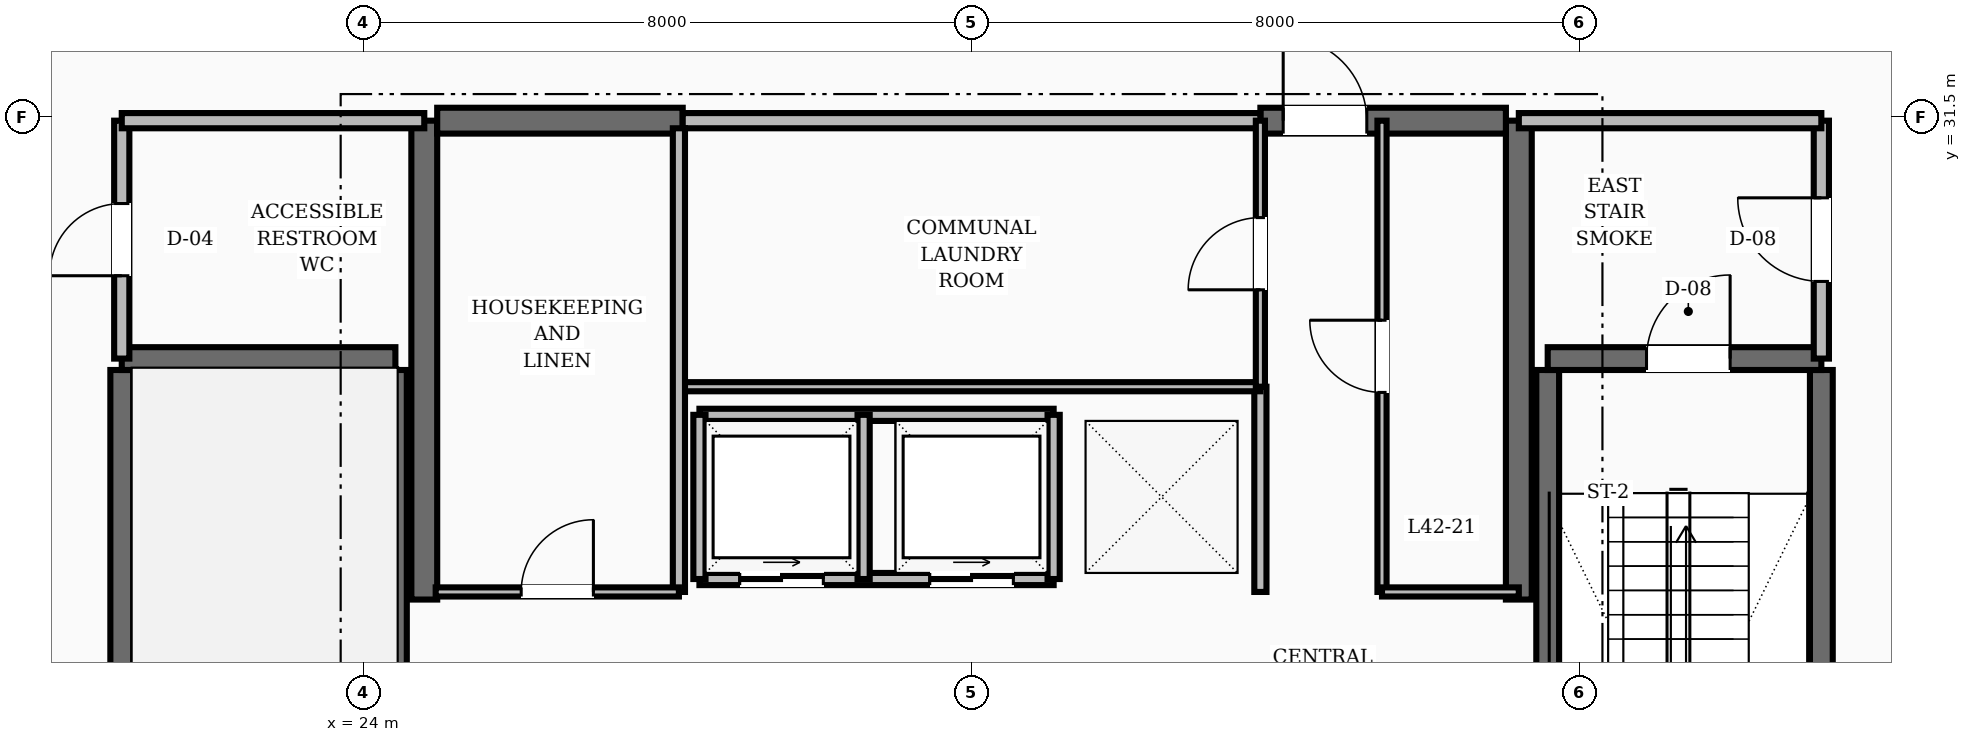
"""IFC4 building model, lengths in metres.
Left out: names, types, materials, properties, quantities, classifications, styles, units other than length and angle.
Written with IfcOpenShell. Run it as: python <this file> out.ifc"""

import sys

from ifc_helpers import new_model, si_unit, direction, frame, frame_2d, origin, place, context, subcontext, project, spatial, rectangle, extrude, element, fill, save


model = new_model("IFC4")
c1 = context("Model", 3, precision=1e-05, world=origin(), true_north=direction((0.0, 1.0)))
c2 = subcontext(c1, "Body", "Model", "MODEL_VIEW")
j1 = project(units=[si_unit("LENGTHUNIT", "METRE"), si_unit("PLANEANGLEUNIT", "RADIAN")], contexts=[c1])
p1 = place(None, origin())
s1 = spatial("IfcSite", under=j1, at=p1, CompositionType="ELEMENT")
p2 = place(p1, origin())
s2 = spatial("IfcBuilding", under=s1, at=p2, CompositionType="ELEMENT")
p3 = place(p2, frame((0.0, 0.0, 164.0)))
s3 = spatial("IfcBuildingStorey", under=s2, at=p3, CompositionType="ELEMENT", Elevation=164.0)
for number, where, z_axis, x_axis in (
    (1, (24.8, 25.15, 0.0), (0.0, 0.0, 1.0), (0.0, 1.0, 0.0)),
    (2, (39.2, 25.15, 0.0), (0.0, 0.0, 1.0), (0.0, 1.0, 0.0)),
):
    element("IfcWall", number, at=place(p3, frame(where, z_axis=z_axis, x_axis=x_axis)), inside=s3, PredefinedType="SHEAR", context=c2, shape_type="SweptSolid", body=[
        extrude(rectangle(XDim=6.3, YDim=0.34, at=frame_2d((3.15, 0.0))), origin(), (0.0, 0.0, 1.0), 3.6),
    ])
p4 = place(p3, frame((24.97, 31.45, 0.0), z_axis=(0.0, 0.0, 1.0), x_axis=(1.0, 0.0, 0.0)))
e3 = element("IfcWall", 3, at=p4, inside=s3, PredefinedType="SHEAR", context=c2, shape_type="SweptSolid", body=[
    extrude(rectangle(XDim=3.23, YDim=0.34, at=frame_2d((1.615, 0.0))), origin(), (0.0, 0.0, 1.0), 3.6),
])
p5 = place(p3, frame((35.8, 31.45, 0.0), z_axis=(0.0, 0.0, 1.0), x_axis=(1.0, 0.0, 0.0)))
e4 = element("IfcWall", 4, at=p5, inside=s3, PredefinedType="SHEAR", context=c2, shape_type="SweptSolid", body=[
    extrude(rectangle(XDim=3.23, YDim=0.34, at=frame_2d((1.615, 0.0))), origin(), (0.0, 0.0, 1.0), 3.6),
])
p6 = place(p5, frame((0.3, 0.0, 0.0)))
e5 = element("IfcOpeningElement", 5, at=p6, cuts=e4, PredefinedType="OPENING", context=c2, shape_type="SweptSolid", body=[
    extrude(rectangle(XDim=1.1, YDim=2.1, at=frame_2d((0.55, 1.05))), frame((0.0, 0.18, 0.0), z_axis=(0.0, -1.0, 0.0), x_axis=(1.0, 0.0, 0.0)), (0.0, 0.0, 1.0), 0.36),
])
for number, where, z_axis, x_axis in (
    (6, (20.82, 19.43, 0.0), (0.0, 0.0, 1.0), (0.0, 1.0, 0.0)),
    (7, (24.42, 19.43, 0.0), (0.0, 0.0, 1.0), (0.0, 1.0, 0.0)),
):
    element("IfcWall", number, at=place(p3, frame(where, z_axis=z_axis, x_axis=x_axis)), inside=s3, PredefinedType="SHEAR", context=c2, shape_type="SweptSolid", body=[
        extrude(rectangle(XDim=8.74, YDim=0.3, at=frame_2d((4.37, 0.0))), origin(), (0.0, 0.0, 1.0), 3.6),
    ])
p7 = place(p3, frame((20.82, 28.32, 0.0), z_axis=(0.0, 0.0, 1.0), x_axis=(1.0, 0.0, 0.0)))
e8 = element("IfcWall", 8, at=p7, inside=s3, PredefinedType="SHEAR", context=c2, shape_type="SweptSolid", body=[
    extrude(rectangle(XDim=3.6, YDim=0.3, at=frame_2d((1.8, 0.0))), origin(), (0.0, 0.0, 1.0), 3.6),
])
for number, where, z_axis, x_axis in (
    (9, (43.18, 19.43, 0.0), (0.0, 0.0, 1.0), (0.0, 1.0, 0.0)),
    (10, (39.58, 19.43, 0.0), (0.0, 0.0, 1.0), (0.0, 1.0, 0.0)),
):
    element("IfcWall", number, at=place(p3, frame(where, z_axis=z_axis, x_axis=x_axis)), inside=s3, PredefinedType="SHEAR", context=c2, shape_type="SweptSolid", body=[
        extrude(rectangle(XDim=8.74, YDim=0.3, at=frame_2d((4.37, 0.0))), origin(), (0.0, 0.0, 1.0), 3.6),
    ])
p8 = place(p3, frame((39.58, 28.32, 0.0), z_axis=(0.0, 0.0, 1.0), x_axis=(1.0, 0.0, 0.0)))
e11 = element("IfcWall", 11, at=p8, inside=s3, PredefinedType="SHEAR", context=c2, shape_type="SweptSolid", body=[
    extrude(rectangle(XDim=3.6, YDim=0.3, at=frame_2d((1.8, 0.0))), origin(), (0.0, 0.0, 1.0), 3.6),
])
p9 = place(p8, frame((1.3, 0.0, 0.0)))
e12 = element("IfcOpeningElement", 12, at=p9, cuts=e11, PredefinedType="OPENING", context=c2, shape_type="SweptSolid", body=[
    extrude(rectangle(XDim=1.1, YDim=2.1, at=frame_2d((0.55, 1.05))), frame((0.0, 0.16, 0.0), z_axis=(0.0, -1.0, 0.0), x_axis=(1.0, 0.0, 0.0)), (0.0, 0.0, 1.0), 0.32),
])
p10 = place(p3, frame((43.18, 28.32, 0.0), z_axis=(0.0, 0.0, 1.0), x_axis=(0.0, 1.0, 0.0)))
e13 = element("IfcWall", 13, at=p10, inside=s3, PredefinedType="SOLIDWALL", context=c2, shape_type="SweptSolid", body=[
    extrude(rectangle(XDim=3.13, YDim=0.2, at=frame_2d((1.565, 0.0))), origin(), (0.0, 0.0, 1.0), 2.8),
])
p11 = place(p10, frame((1.015, 0.0, 0.0)))
e14 = element("IfcOpeningElement", 14, at=p11, cuts=e13, PredefinedType="OPENING", context=c2, shape_type="SweptSolid", body=[
    extrude(rectangle(XDim=1.1, YDim=2.1, at=frame_2d((0.55, 1.05))), frame((0.0, 0.11, 0.0), z_axis=(0.0, -1.0, 0.0), x_axis=(1.0, 0.0, 0.0)), (0.0, 0.0, 1.0), 0.22),
])
p12 = place(p3, frame((39.2, 31.45, 0.0), z_axis=(0.0, 0.0, 1.0), x_axis=(1.0, 0.0, 0.0)))
e15 = element("IfcWall", 15, at=p12, inside=s3, PredefinedType="SOLIDWALL", context=c2, shape_type="SweptSolid", body=[
    extrude(rectangle(XDim=3.98, YDim=0.2, at=frame_2d((1.99, 0.0))), origin(), (0.0, 0.0, 1.0), 2.8),
])
p13 = place(p3, frame((20.82, 28.32, 0.0), z_axis=(0.0, 0.0, 1.0), x_axis=(0.0, 1.0, 0.0)))
e16 = element("IfcWall", 16, at=p13, inside=s3, PredefinedType="SOLIDWALL", context=c2, shape_type="SweptSolid", body=[
    extrude(rectangle(XDim=3.13, YDim=0.2, at=frame_2d((1.565, 0.0))), origin(), (0.0, 0.0, 1.0), 2.8),
])
p14 = place(p13, frame((1.09, 0.0, 0.0)))
e17 = element("IfcOpeningElement", 17, at=p14, cuts=e16, PredefinedType="OPENING", context=c2, shape_type="SweptSolid", body=[
    extrude(rectangle(XDim=0.95, YDim=2.1, at=frame_2d((0.475, 1.05))), frame((0.0, 0.11, 0.0), z_axis=(0.0, -1.0, 0.0), x_axis=(1.0, 0.0, 0.0)), (0.0, 0.0, 1.0), 0.22),
])
p15 = place(p3, frame((20.82, 31.45, 0.0), z_axis=(0.0, 0.0, 1.0), x_axis=(1.0, 0.0, 0.0)))
e18 = element("IfcWall", 18, at=p15, inside=s3, PredefinedType="SOLIDWALL", context=c2, shape_type="SweptSolid", body=[
    extrude(rectangle(XDim=3.98, YDim=0.2, at=frame_2d((1.99, 0.0))), origin(), (0.0, 0.0, 1.0), 2.8),
])
p16 = place(p3, frame((35.8, 25.25, 0.0), z_axis=(0.0, 0.0, 1.0), x_axis=(0.0, 1.0, 0.0)))
e19 = element("IfcWall", 19, at=p16, inside=s3, PredefinedType="SOLIDWALL", context=c2, shape_type="SweptSolid", body=[
    extrude(rectangle(XDim=2.7, YDim=0.16, at=frame_2d((1.35, 0.0))), origin(), (0.0, 0.0, 1.0), 2.8),
])
p17 = place(p3, frame((28.42, 25.42, 0.0), z_axis=(0.0, 0.0, 1.0), x_axis=(1.0, 0.0, 0.0)))
e20 = element("IfcWall", 20, at=p17, inside=s3, PredefinedType="SOLIDWALL", context=c2, shape_type="SweptSolid", body=[
    extrude(rectangle(XDim=4.66, YDim=0.16, at=frame_2d((2.33, 0.0))), origin(), (0.0, 0.0, 1.0), 2.8),
])
p18 = place(p17, frame((0.53, 0.0, 0.0)))
e21 = element("IfcOpeningElement", 21, at=p18, cuts=e20, PredefinedType="OPENING", context=c2, shape_type="SweptSolid", body=[
    extrude(rectangle(XDim=1.1, YDim=2.15, at=frame_2d((0.55, 1.075))), frame((0.0, 0.09, 0.0), z_axis=(0.0, -1.0, 0.0), x_axis=(1.0, 0.0, 0.0)), (0.0, 0.0, 1.0), 0.18),
])
p19 = place(p17, frame((3.03, 0.0, 0.0)))
e22 = element("IfcOpeningElement", 22, at=p19, cuts=e20, PredefinedType="OPENING", context=c2, shape_type="SweptSolid", body=[
    extrude(rectangle(XDim=1.1, YDim=2.15, at=frame_2d((0.55, 1.075))), frame((0.0, 0.09, 0.0), z_axis=(0.0, -1.0, 0.0), x_axis=(1.0, 0.0, 0.0)), (0.0, 0.0, 1.0), 0.18),
])
p20 = place(p3, frame((28.42, 27.58, 0.0), z_axis=(0.0, 0.0, 1.0), x_axis=(1.0, 0.0, 0.0)))
e23 = element("IfcWall", 23, at=p20, inside=s3, PredefinedType="SOLIDWALL", context=c2, shape_type="SweptSolid", body=[
    extrude(rectangle(XDim=4.66, YDim=0.16, at=frame_2d((2.33, 0.0))), origin(), (0.0, 0.0, 1.0), 2.8),
])
for number, where, z_axis, x_axis in (
    (24, (28.42, 25.42, 0.0), (0.0, 0.0, 1.0), (0.0, 1.0, 0.0)),
    (25, (30.58, 25.42, 0.0), (0.0, 0.0, 1.0), (0.0, 1.0, 0.0)),
    (26, (33.08, 25.42, 0.0), (0.0, 0.0, 1.0), (0.0, 1.0, 0.0)),
):
    element("IfcWall", number, at=place(p3, frame(where, z_axis=z_axis, x_axis=x_axis)), inside=s3, PredefinedType="SOLIDWALL", context=c2, shape_type="SweptSolid", body=[
        extrude(rectangle(XDim=2.16, YDim=0.16, at=frame_2d((1.08, 0.0))), origin(), (0.0, 0.0, 1.0), 2.8),
    ])
p21 = place(p3, frame((28.2, 31.45, 0.0), z_axis=(0.0, 0.0, 1.0), x_axis=(1.0, 0.0, 0.0)))
e27 = element("IfcWall", 27, at=p21, inside=s3, PredefinedType="SOLIDWALL", context=c2, shape_type="SweptSolid", body=[
    extrude(rectangle(XDim=7.6, YDim=0.2, at=frame_2d((3.8, 0.0))), origin(), (0.0, 0.0, 1.0), 2.8),
])
p22 = place(p3, frame((28.2, 27.95, 0.0), z_axis=(0.0, 0.0, 1.0), x_axis=(1.0, 0.0, 0.0)))
e28 = element("IfcWall", 28, at=p22, inside=s3, PredefinedType="PARTITIONING", context=c2, shape_type="SweptSolid", body=[
    extrude(rectangle(XDim=7.6, YDim=0.12, at=frame_2d((3.8, 0.0))), origin(), (0.0, 0.0, 1.0), 2.8),
])
p23 = place(p3, frame((35.8, 27.95, 0.0), z_axis=(0.0, 0.0, 1.0), x_axis=(0.0, 1.0, 0.0)))
e29 = element("IfcWall", 29, at=p23, inside=s3, PredefinedType="PARTITIONING", context=c2, shape_type="SweptSolid", body=[
    extrude(rectangle(XDim=3.5, YDim=0.12, at=frame_2d((1.75, 0.0))), origin(), (0.0, 0.0, 1.0), 2.8),
])
p24 = place(p23, frame((1.275, 0.0, 0.0)))
e30 = element("IfcOpeningElement", 30, at=p24, cuts=e29, PredefinedType="OPENING", context=c2, shape_type="SweptSolid", body=[
    extrude(rectangle(XDim=0.95, YDim=2.1, at=frame_2d((0.475, 1.05))), frame((0.0, 0.07, 0.0), z_axis=(0.0, -1.0, 0.0), x_axis=(1.0, 0.0, 0.0)), (0.0, 0.0, 1.0), 0.14),
])
p25 = place(p3, frame((28.15, 25.25, 0.0), z_axis=(0.0, 0.0, 1.0), x_axis=(0.0, 1.0, 0.0)))
e31 = element("IfcWall", 31, at=p25, inside=s3, PredefinedType="SOLIDWALL", context=c2, shape_type="SweptSolid", body=[
    extrude(rectangle(XDim=6.1, YDim=0.16, at=frame_2d((3.05, 0.0))), origin(), (0.0, 0.0, 1.0), 2.8),
])
p26 = place(p3, frame((24.95, 25.25, 0.0), z_axis=(0.0, 0.0, 1.0), x_axis=(1.0, 0.0, 0.0)))
e32 = element("IfcWall", 32, at=p26, inside=s3, PredefinedType="PARTITIONING", context=c2, shape_type="SweptSolid", body=[
    extrude(rectangle(XDim=3.2, YDim=0.12, at=frame_2d((1.6, 0.0))), origin(), (0.0, 0.0, 1.0), 2.8),
])
p27 = place(p26, frame((1.125, 0.0, 0.0)))
e33 = element("IfcOpeningElement", 33, at=p27, cuts=e32, PredefinedType="OPENING", context=c2, shape_type="SweptSolid", body=[
    extrude(rectangle(XDim=0.95, YDim=2.1, at=frame_2d((0.475, 1.05))), frame((0.0, 0.07, 0.0), z_axis=(0.0, -1.0, 0.0), x_axis=(1.0, 0.0, 0.0)), (0.0, 0.0, 1.0), 0.14),
])
p28 = place(p3, frame((37.4, 25.25, 0.0), z_axis=(0.0, 0.0, 1.0), x_axis=(0.0, 1.0, 0.0)))
e34 = element("IfcWall", 34, at=p28, inside=s3, PredefinedType="PARTITIONING", context=c2, shape_type="SweptSolid", body=[
    extrude(rectangle(XDim=6.2, YDim=0.12, at=frame_2d((3.1, 0.0))), origin(), (0.0, 0.0, 1.0), 2.8),
])
p29 = place(p28, frame((2.625, 0.0, 0.0)))
e35 = element("IfcOpeningElement", 35, at=p29, cuts=e34, PredefinedType="OPENING", context=c2, shape_type="SweptSolid", body=[
    extrude(rectangle(XDim=0.95, YDim=2.1, at=frame_2d((0.475, 1.05))), frame((0.0, 0.07, 0.0), z_axis=(0.0, -1.0, 0.0), x_axis=(1.0, 0.0, 0.0)), (0.0, 0.0, 1.0), 0.14),
])
p30 = place(p3, frame((37.4, 25.25, 0.0), z_axis=(0.0, 0.0, 1.0), x_axis=(1.0, 0.0, 0.0)))
e36 = element("IfcWall", 36, at=p30, inside=s3, PredefinedType="PARTITIONING", context=c2, shape_type="SweptSolid", body=[
    extrude(rectangle(XDim=1.8, YDim=0.12, at=frame_2d((0.9, 0.0))), origin(), (0.0, 0.0, 1.0), 2.8),
])
p31 = place(p9, origin())
e37 = element("IfcDoor", 37, at=p31, inside=s3, OperationType="SINGLE_SWING_RIGHT", PredefinedType="DOOR", context=c2, shape_type="SweptSolid", body=[
    extrude(rectangle(XDim=1.1, YDim=2.1, at=frame_2d((0.55, 1.05))), frame((0.0, 0.025, 0.0), z_axis=(0.0, -1.0, 0.0), x_axis=(1.0, 0.0, 0.0)), (0.0, 0.0, 1.0), 0.05),
])
fill(e12, e37)
p32 = place(p11, origin())
e38 = element("IfcDoor", 38, at=p32, inside=s3, OperationType="SINGLE_SWING_RIGHT", PredefinedType="DOOR", context=c2, shape_type="SweptSolid", body=[
    extrude(rectangle(XDim=1.1, YDim=2.1, at=frame_2d((0.55, 1.05))), frame((0.0, 0.025, 0.0), z_axis=(0.0, -1.0, 0.0), x_axis=(1.0, 0.0, 0.0)), (0.0, 0.0, 1.0), 0.05),
])
fill(e14, e38)
p33 = place(p14, origin())
e39 = element("IfcDoor", 39, at=p33, inside=s3, OperationType="SINGLE_SWING_LEFT", PredefinedType="DOOR", context=c2, shape_type="SweptSolid", body=[
    extrude(rectangle(XDim=0.95, YDim=2.1, at=frame_2d((0.475, 1.05))), frame((0.0, 0.025, 0.0), z_axis=(0.0, -1.0, 0.0), x_axis=(1.0, 0.0, 0.0)), (0.0, 0.0, 1.0), 0.05),
])
fill(e17, e39)
p34 = place(p6, origin())
e40 = element("IfcDoor", 40, at=p34, inside=s3, OperationType="SINGLE_SWING_LEFT", PredefinedType="DOOR", context=c2, shape_type="SweptSolid", body=[
    extrude(rectangle(XDim=1.1, YDim=2.1, at=frame_2d((0.55, 1.05))), frame((0.0, 0.025, 0.0), z_axis=(0.0, -1.0, 0.0), x_axis=(1.0, 0.0, 0.0)), (0.0, 0.0, 1.0), 0.05),
])
fill(e5, e40)
p35 = place(p18, origin())
e41 = element("IfcDoor", 41, at=p35, inside=s3, OperationType="SLIDING_TO_RIGHT", PredefinedType="DOOR", context=c2, shape_type="SweptSolid", body=[
    extrude(rectangle(XDim=1.1, YDim=2.15, at=frame_2d((0.55, 1.075))), frame((0.0, 0.025, 0.0), z_axis=(0.0, -1.0, 0.0), x_axis=(1.0, 0.0, 0.0)), (0.0, 0.0, 1.0), 0.05),
])
fill(e21, e41)
p36 = place(p19, origin())
e42 = element("IfcDoor", 42, at=p36, inside=s3, OperationType="SLIDING_TO_RIGHT", PredefinedType="DOOR", context=c2, shape_type="SweptSolid", body=[
    extrude(rectangle(XDim=1.1, YDim=2.15, at=frame_2d((0.55, 1.075))), frame((0.0, 0.025, 0.0), z_axis=(0.0, -1.0, 0.0), x_axis=(1.0, 0.0, 0.0)), (0.0, 0.0, 1.0), 0.05),
])
fill(e22, e42)
p37 = place(p24, origin())
e43 = element("IfcDoor", 43, at=p37, inside=s3, OperationType="SINGLE_SWING_LEFT", PredefinedType="DOOR", context=c2, shape_type="SweptSolid", body=[
    extrude(rectangle(XDim=0.95, YDim=2.1, at=frame_2d((0.475, 1.05))), frame((0.0, 0.025, 0.0), z_axis=(0.0, -1.0, 0.0), x_axis=(1.0, 0.0, 0.0)), (0.0, 0.0, 1.0), 0.05),
])
fill(e30, e43)
p38 = place(p27, origin())
e44 = element("IfcDoor", 44, at=p38, inside=s3, OperationType="SINGLE_SWING_RIGHT", PredefinedType="DOOR", context=c2, shape_type="SweptSolid", body=[
    extrude(rectangle(XDim=0.95, YDim=2.1, at=frame_2d((0.475, 1.05))), frame((0.0, 0.025, 0.0), z_axis=(0.0, -1.0, 0.0), x_axis=(1.0, 0.0, 0.0)), (0.0, 0.0, 1.0), 0.05),
])
fill(e33, e44)
p39 = place(p29, origin())
e45 = element("IfcDoor", 45, at=p39, inside=s3, OperationType="SINGLE_SWING_RIGHT", PredefinedType="DOOR", context=c2, shape_type="SweptSolid", body=[
    extrude(rectangle(XDim=0.95, YDim=2.1, at=frame_2d((0.475, 1.05))), frame((0.0, 0.025, 0.0), z_axis=(0.0, -1.0, 0.0), x_axis=(1.0, 0.0, 0.0)), (0.0, 0.0, 1.0), 0.05),
])
fill(e35, e45)
save(model, sys.argv[1])
